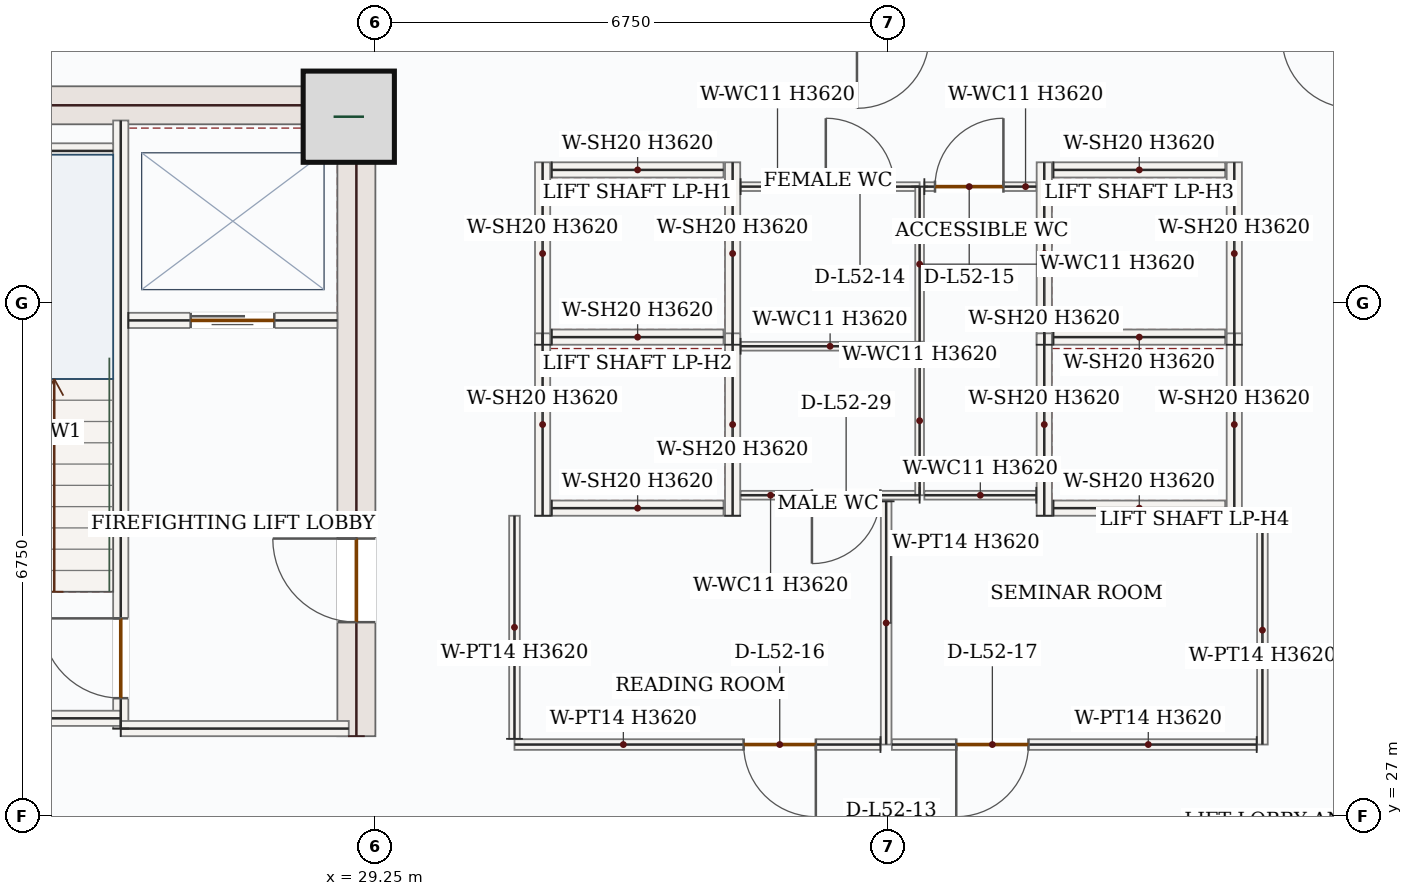
"""IFC4 building model, lengths in metres.
Left out: names, types, materials, properties, quantities, classifications, styles, units other than length and angle.
Written with IfcOpenShell. Run it as: python <this file> out.ifc"""

import sys

from ifc_helpers import new_model, si_unit, direction, frame, frame_2d, origin, origin_2d, place, context, subcontext, project, spatial, rectangle, extrude, source, transform, mapped, element, fill, save


model = new_model("IFC4")
c1 = context("Model", 3, precision=1e-05, world=origin(), true_north=direction((0.0, 1.0)))
c2 = subcontext(c1, "Body", "Model", "MODEL_VIEW")
j1 = project(units=[si_unit("LENGTHUNIT", "METRE"), si_unit("PLANEANGLEUNIT", "RADIAN")], contexts=[c1])
p1 = place(None, origin())
s1 = spatial("IfcSite", under=j1, at=p1, CompositionType="ELEMENT")
p2 = place(p1, origin())
s2 = spatial("IfcBuilding", under=s1, at=p2, CompositionType="ELEMENT")
p3 = place(p2, frame((0.0, 0.0, 221.4)))
s3 = spatial("IfcBuildingStorey", under=s2, at=p3, CompositionType="ELEMENT", Elevation=221.4)
p4 = place(p3, frame((29.0, 28.05, 0.0), z_axis=(0.0, 0.0, 1.0), x_axis=(0.0, 1.0, 0.0)))
e1 = element("IfcWall", 1, at=p4, inside=s3, PredefinedType="SHEAR", context=c2, shape_type="SweptSolid", body=[
    extrude(rectangle(XDim=8.55, YDim=0.5, at=frame_2d((4.275, 0.0))), origin(), (0.0, 0.0, 1.0), 3.62),
])
p5 = place(p4, frame((1.5, 0.0, 0.0)))
e2 = element("IfcOpeningElement", 2, at=p5, cuts=e1, PredefinedType="OPENING", context=c2, shape_type="SweptSolid", body=[
    extrude(rectangle(XDim=1.1, YDim=2.2, at=frame_2d((0.55, 1.1))), frame((0.0, 0.26, 0.0), z_axis=(0.0, -1.0, 0.0), x_axis=(1.0, 0.0, 0.0)), (0.0, 0.0, 1.0), 0.52),
])
m1 = source(origin(), c2, "Body", "SweptSolid", [
    extrude(rectangle(XDim=7.0, YDim=0.5, at=frame_2d((3.5, 0.0))), origin(), (0.0, 0.0, 1.0), 3.62),
])
p6 = place(p3, frame((21.75, 36.35, 0.0), z_axis=(0.0, 0.0, 1.0), x_axis=(1.0, 0.0, 0.0)))
e3 = element("IfcWall", 3, at=p6, inside=s3, PredefinedType="SHEAR", context=c2, shape_type="MappedRepresentation", body=[
    mapped(m1, transform((0.0, 0.0, 0.0), x_axis=(1.0, 0.0, 0.0), y_axis=(0.0, 1.0, 0.0), z_axis=(0.0, 0.0, 1.0), scale=1.0)),
])
m2 = source(origin(), c2, "Body", "SweptSolid", [
    extrude(rectangle(XDim=1.2, YDim=1.2, at=origin_2d()), origin(), (0.0, 0.0, 1.0), 3.9),
])
p7 = place(p3, frame((28.9, 36.2, 0.0), z_axis=(0.0, 0.0, 1.0), x_axis=(1.0, 0.0, 0.0)))
e4 = element("IfcColumn", 4, at=p7, inside=s3, PredefinedType="COLUMN", context=c2, shape_type="MappedRepresentation", body=[
    mapped(m2, transform((0.0, 0.0, 0.0), x_axis=(1.0, 0.0, 0.0), y_axis=(0.0, 1.0, 0.0), z_axis=(0.0, 0.0, 1.0), scale=1.0)),
])
p8 = place(p3, frame((25.9, 28.15, 0.0), z_axis=(0.0, 0.0, 1.0), x_axis=(0.0, 1.0, 0.0)))
e5 = element("IfcWall", 5, at=p8, inside=s3, PredefinedType="SOLIDWALL", context=c2, shape_type="SweptSolid", body=[
    extrude(rectangle(XDim=8.0, YDim=0.2, at=frame_2d((4.0, 0.0))), origin(), (0.0, 0.0, 1.0), 3.62),
])
p9 = place(p8, frame((0.4, 0.0, 0.0)))
e6 = element("IfcOpeningElement", 6, at=p9, cuts=e5, PredefinedType="OPENING", context=c2, shape_type="SweptSolid", body=[
    extrude(rectangle(XDim=1.05, YDim=2.15, at=frame_2d((0.525, 1.075))), frame((0.0, 0.11, 0.0), z_axis=(0.0, -1.0, 0.0), x_axis=(1.0, 0.0, 0.0)), (0.0, 0.0, 1.0), 0.22),
])
m3 = source(origin(), c2, "Body", "SweptSolid", [
    extrude(rectangle(XDim=4.25, YDim=0.2, at=frame_2d((2.125, 0.0))), origin(), (0.0, 0.0, 1.0), 3.62),
])
p10 = place(p3, frame((21.65, 28.285, 0.0), z_axis=(0.0, 0.0, 1.0), x_axis=(1.0, 0.0, 0.0)))
e7 = element("IfcWall", 7, at=p10, inside=s3, PredefinedType="SOLIDWALL", context=c2, shape_type="MappedRepresentation", body=[
    mapped(m3, transform((0.0, 0.0, 0.0), x_axis=(1.0, 0.0, 0.0), y_axis=(0.0, 1.0, 0.0), z_axis=(0.0, 0.0, 1.0), scale=1.0)),
])
m4 = source(origin(), c2, "Body", "SweptSolid", [
    extrude(rectangle(XDim=3.0, YDim=0.2, at=frame_2d((1.5, 0.0))), origin(), (0.0, 0.0, 1.0), 3.62),
])
p11 = place(p3, frame((25.9, 28.15, 0.0), z_axis=(0.0, 0.0, 1.0), x_axis=(1.0, 0.0, 0.0)))
e8 = element("IfcWall", 8, at=p11, inside=s3, PredefinedType="SOLIDWALL", context=c2, shape_type="MappedRepresentation", body=[
    mapped(m4, transform((0.0, 0.0, 0.0), x_axis=(1.0, 0.0, 0.0), y_axis=(0.0, 1.0, 0.0), z_axis=(0.0, 0.0, 1.0), scale=1.0)),
])
m5 = source(origin(), c2, "Body", "SweptSolid", [
    extrude(rectangle(XDim=3.25, YDim=0.2, at=frame_2d((1.625, 0.0))), origin(), (0.0, 0.0, 1.0), 3.62),
])
p12 = place(p3, frame((22.55, 35.75, 0.0), z_axis=(0.0, 0.0, 1.0), x_axis=(1.0, 0.0, 0.0)))
e9 = element("IfcWall", 9, at=p12, inside=s3, PredefinedType="SOLIDWALL", context=c2, shape_type="MappedRepresentation", body=[
    mapped(m5, transform((0.0, 0.0, 0.0), x_axis=(1.0, 0.0, 0.0), y_axis=(0.0, 1.0, 0.0), z_axis=(0.0, 0.0, 1.0), scale=1.0)),
])
p13 = place(p3, frame((26.0, 33.52, 0.0), z_axis=(0.0, 0.0, 1.0), x_axis=(1.0, 0.0, 0.0)))
e10 = element("IfcWall", 10, at=p13, inside=s3, PredefinedType="SOLIDWALL", context=c2, shape_type="SweptSolid", body=[
    extrude(rectangle(XDim=2.75, YDim=0.2, at=frame_2d((1.375, 0.0))), origin(), (0.0, 0.0, 1.0), 3.62),
])
p14 = place(p13, frame((0.82, 0.0, 0.0)))
e11 = element("IfcOpeningElement", 11, at=p14, cuts=e10, PredefinedType="OPENING", context=c2, shape_type="SweptSolid", body=[
    extrude(rectangle(XDim=1.1, YDim=2.15, at=frame_2d((0.55, 1.075))), frame((0.0, 0.11, 0.0), z_axis=(0.0, -1.0, 0.0), x_axis=(1.0, 0.0, 0.0)), (0.0, 0.0, 1.0), 0.22),
])
m6 = source(origin(), c2, "Body", "SweptSolid", [
    extrude(rectangle(XDim=2.4, YDim=0.2, at=frame_2d((1.2, 0.0))), origin(), (0.0, 0.0, 1.0), 3.62),
])
for number, where, z_axis, x_axis in (
    (12, (31.45, 33.2, 0.0), (0.0, 0.0, 1.0), (0.0, 1.0, 0.0)),
    (13, (33.95, 33.2, 0.0), (0.0, 0.0, 1.0), (0.0, 1.0, 0.0)),
):
    element("IfcWall", number, at=place(p3, frame(where, z_axis=z_axis, x_axis=x_axis)), inside=s3, PredefinedType="SOLIDWALL", context=c2, shape_type="MappedRepresentation", body=[
        mapped(m6, transform((0.0, 0.0, 0.0), x_axis=(1.0, 0.0, 0.0), y_axis=(0.0, 1.0, 0.0), z_axis=(0.0, 0.0, 1.0), scale=1.0)),
    ])
m7 = source(origin(), c2, "Body", "SweptSolid", [
    extrude(rectangle(XDim=2.26, YDim=0.2, at=frame_2d((1.13, 0.0))), origin(), (0.0, 0.0, 1.0), 3.62),
])
for number, where, z_axis, x_axis in (
    (14, (31.57, 33.3, 0.0), (0.0, 0.0, 1.0), (1.0, 0.0, 0.0)),
    (15, (31.57, 35.5, 0.0), (0.0, 0.0, 1.0), (1.0, 0.0, 0.0)),
):
    element("IfcWall", number, at=place(p3, frame(where, z_axis=z_axis, x_axis=x_axis)), inside=s3, PredefinedType="SOLIDWALL", context=c2, shape_type="MappedRepresentation", body=[
        mapped(m7, transform((0.0, 0.0, 0.0), x_axis=(1.0, 0.0, 0.0), y_axis=(0.0, 1.0, 0.0), z_axis=(0.0, 0.0, 1.0), scale=1.0)),
    ])
for number, where, z_axis, x_axis in (
    (16, (31.45, 30.95, 0.0), (0.0, 0.0, 1.0), (0.0, 1.0, 0.0)),
    (17, (33.95, 30.95, 0.0), (0.0, 0.0, 1.0), (0.0, 1.0, 0.0)),
):
    element("IfcWall", number, at=place(p3, frame(where, z_axis=z_axis, x_axis=x_axis)), inside=s3, PredefinedType="SOLIDWALL", context=c2, shape_type="MappedRepresentation", body=[
        mapped(m6, transform((0.0, 0.0, 0.0), x_axis=(1.0, 0.0, 0.0), y_axis=(0.0, 1.0, 0.0), z_axis=(0.0, 0.0, 1.0), scale=1.0)),
    ])
p15 = place(p3, frame((31.57, 31.05, 0.0), z_axis=(0.0, 0.0, 1.0), x_axis=(1.0, 0.0, 0.0)))
e18 = element("IfcWall", 18, at=p15, inside=s3, PredefinedType="SOLIDWALL", context=c2, shape_type="MappedRepresentation", body=[
    mapped(m7, transform((0.0, 0.0, 0.0), x_axis=(1.0, 0.0, 0.0), y_axis=(0.0, 1.0, 0.0), z_axis=(0.0, 0.0, 1.0), scale=1.0)),
])
for number, where, z_axis, x_axis in (
    (19, (38.05, 33.2, 0.0), (0.0, 0.0, 1.0), (0.0, 1.0, 0.0)),
    (20, (40.55, 33.2, 0.0), (0.0, 0.0, 1.0), (0.0, 1.0, 0.0)),
):
    element("IfcWall", number, at=place(p3, frame(where, z_axis=z_axis, x_axis=x_axis)), inside=s3, PredefinedType="SOLIDWALL", context=c2, shape_type="MappedRepresentation", body=[
        mapped(m6, transform((0.0, 0.0, 0.0), x_axis=(1.0, 0.0, 0.0), y_axis=(0.0, 1.0, 0.0), z_axis=(0.0, 0.0, 1.0), scale=1.0)),
    ])
for number, where, z_axis, x_axis in (
    (21, (38.17, 33.3, 0.0), (0.0, 0.0, 1.0), (1.0, 0.0, 0.0)),
    (22, (38.17, 35.5, 0.0), (0.0, 0.0, 1.0), (1.0, 0.0, 0.0)),
):
    element("IfcWall", number, at=place(p3, frame(where, z_axis=z_axis, x_axis=x_axis)), inside=s3, PredefinedType="SOLIDWALL", context=c2, shape_type="MappedRepresentation", body=[
        mapped(m7, transform((0.0, 0.0, 0.0), x_axis=(1.0, 0.0, 0.0), y_axis=(0.0, 1.0, 0.0), z_axis=(0.0, 0.0, 1.0), scale=1.0)),
    ])
for number, where, z_axis, x_axis in (
    (23, (38.05, 30.95, 0.0), (0.0, 0.0, 1.0), (0.0, 1.0, 0.0)),
    (24, (40.55, 30.95, 0.0), (0.0, 0.0, 1.0), (0.0, 1.0, 0.0)),
):
    element("IfcWall", number, at=place(p3, frame(where, z_axis=z_axis, x_axis=x_axis)), inside=s3, PredefinedType="SOLIDWALL", context=c2, shape_type="MappedRepresentation", body=[
        mapped(m6, transform((0.0, 0.0, 0.0), x_axis=(1.0, 0.0, 0.0), y_axis=(0.0, 1.0, 0.0), z_axis=(0.0, 0.0, 1.0), scale=1.0)),
    ])
p16 = place(p3, frame((38.17, 31.05, 0.0), z_axis=(0.0, 0.0, 1.0), x_axis=(1.0, 0.0, 0.0)))
e25 = element("IfcWall", 25, at=p16, inside=s3, PredefinedType="SOLIDWALL", context=c2, shape_type="MappedRepresentation", body=[
    mapped(m7, transform((0.0, 0.0, 0.0), x_axis=(1.0, 0.0, 0.0), y_axis=(0.0, 1.0, 0.0), z_axis=(0.0, 0.0, 1.0), scale=1.0)),
])
p17 = place(p3, frame((36.41, 31.22, 0.0), z_axis=(0.0, 0.0, 1.0), x_axis=(-1.0, 0.0, 0.0)))
e26 = element("IfcWall", 26, at=p17, inside=s3, PredefinedType="PARTITIONING", context=c2, shape_type="SweptSolid", body=[
    extrude(rectangle(XDim=2.355, YDim=0.115, at=frame_2d((1.177, 0.0))), origin(), (0.0, 0.0, 1.0), 3.62),
])
p18 = place(p17, frame((0.517, 0.0, 0.0)))
e27 = element("IfcOpeningElement", 27, at=p18, cuts=e26, PredefinedType="OPENING", context=c2, shape_type="SweptSolid", body=[
    extrude(rectangle(XDim=0.9, YDim=2.1, at=frame_2d((0.45, 1.05))), frame((0.0, 0.067, 0.0), z_axis=(0.0, -1.0, 0.0), x_axis=(1.0, 0.0, 0.0)), (0.0, 0.0, 1.0), 0.135),
])
m8 = source(origin(), c2, "Body", "SweptSolid", [
    extrude(rectangle(XDim=2.355, YDim=0.115, at=frame_2d((1.177, 0.0))), origin(), (0.0, 0.0, 1.0), 3.62),
])
p19 = place(p3, frame((34.055, 33.18, 0.0), z_axis=(0.0, 0.0, 1.0), x_axis=(1.0, 0.0, 0.0)))
e28 = element("IfcWall", 28, at=p19, inside=s3, PredefinedType="PARTITIONING", context=c2, shape_type="MappedRepresentation", body=[
    mapped(m8, transform((0.0, 0.0, 0.0), x_axis=(1.0, 0.0, 0.0), y_axis=(0.0, 1.0, 0.0), z_axis=(0.0, 0.0, 1.0), scale=1.0)),
])
m9 = source(origin(), c2, "Body", "SweptSolid", [
    extrude(rectangle(XDim=1.96, YDim=0.115, at=frame_2d((0.98, 0.0))), origin(), (0.0, 0.0, 1.0), 3.62),
])
p20 = place(p3, frame((36.41, 33.18, 0.0), z_axis=(0.0, 0.0, 1.0), x_axis=(0.0, -1.0, 0.0)))
e29 = element("IfcWall", 29, at=p20, inside=s3, PredefinedType="PARTITIONING", context=c2, shape_type="MappedRepresentation", body=[
    mapped(m9, transform((0.0, 0.0, 0.0), x_axis=(1.0, 0.0, 0.0), y_axis=(0.0, 1.0, 0.0), z_axis=(0.0, 0.0, 1.0), scale=1.0)),
])
p21 = place(p3, frame((34.055, 35.28, 0.0), z_axis=(0.0, 0.0, 1.0), x_axis=(1.0, 0.0, 0.0)))
e30 = element("IfcWall", 30, at=p21, inside=s3, PredefinedType="PARTITIONING", context=c2, shape_type="SweptSolid", body=[
    extrude(rectangle(XDim=2.355, YDim=0.115, at=frame_2d((1.177, 0.0))), origin(), (0.0, 0.0, 1.0), 3.62),
])
p22 = place(p21, frame((1.121, 0.0, 0.0)))
e31 = element("IfcOpeningElement", 31, at=p22, cuts=e30, PredefinedType="OPENING", context=c2, shape_type="SweptSolid", body=[
    extrude(rectangle(XDim=0.9, YDim=2.1, at=frame_2d((0.45, 1.05))), frame((0.0, 0.067, 0.0), z_axis=(0.0, -1.0, 0.0), x_axis=(1.0, 0.0, 0.0)), (0.0, 0.0, 1.0), 0.135),
])
m10 = source(origin(), c2, "Body", "SweptSolid", [
    extrude(rectangle(XDim=2.04, YDim=0.115, at=frame_2d((1.02, 0.0))), origin(), (0.0, 0.0, 1.0), 3.62),
])
p23 = place(p3, frame((36.41, 35.28, 0.0), z_axis=(0.0, 0.0, 1.0), x_axis=(0.0, -1.0, 0.0)))
e32 = element("IfcWall", 32, at=p23, inside=s3, PredefinedType="PARTITIONING", context=c2, shape_type="MappedRepresentation", body=[
    mapped(m10, transform((0.0, 0.0, 0.0), x_axis=(1.0, 0.0, 0.0), y_axis=(0.0, 1.0, 0.0), z_axis=(0.0, 0.0, 1.0), scale=1.0)),
])
m11 = source(origin(), c2, "Body", "SweptSolid", [
    extrude(rectangle(XDim=1.473, YDim=0.115, at=frame_2d((0.736, 0.0))), origin(), (0.0, 0.0, 1.0), 3.62),
])
p24 = place(p3, frame((37.945, 31.22, 0.0), z_axis=(0.0, 0.0, 1.0), x_axis=(-1.0, 0.0, 0.0)))
e33 = element("IfcWall", 33, at=p24, inside=s3, PredefinedType="PARTITIONING", context=c2, shape_type="MappedRepresentation", body=[
    mapped(m11, transform((0.0, 0.0, 0.0), x_axis=(1.0, 0.0, 0.0), y_axis=(0.0, 1.0, 0.0), z_axis=(0.0, 0.0, 1.0), scale=1.0)),
])
p25 = place(p3, frame((36.472, 35.28, 0.0), z_axis=(0.0, 0.0, 1.0), x_axis=(1.0, 0.0, 0.0)))
e34 = element("IfcWall", 34, at=p25, inside=s3, PredefinedType="PARTITIONING", context=c2, shape_type="SweptSolid", body=[
    extrude(rectangle(XDim=1.473, YDim=0.115, at=frame_2d((0.736, 0.0))), origin(), (0.0, 0.0, 1.0), 3.62),
])
p26 = place(p25, frame((0.14, 0.0, 0.0)))
e35 = element("IfcOpeningElement", 35, at=p26, cuts=e34, PredefinedType="OPENING", context=c2, shape_type="SweptSolid", body=[
    extrude(rectangle(XDim=0.9, YDim=2.1, at=frame_2d((0.45, 1.05))), frame((0.0, 0.067, 0.0), z_axis=(0.0, -1.0, 0.0), x_axis=(1.0, 0.0, 0.0)), (0.0, 0.0, 1.0), 0.135),
])
m12 = source(origin(), c2, "Body", "SweptSolid", [
    extrude(rectangle(XDim=3.2, YDim=0.14, at=frame_2d((1.6, 0.0))), origin(), (0.0, 0.0, 1.0), 3.62),
])
p27 = place(p3, frame((35.97, 31.14, 0.0), z_axis=(0.0, 0.0, 1.0), x_axis=(0.0, -1.0, 0.0)))
e36 = element("IfcWall", 36, at=p27, inside=s3, PredefinedType="PARTITIONING", context=c2, shape_type="MappedRepresentation", body=[
    mapped(m12, transform((0.0, 0.0, 0.0), x_axis=(1.0, 0.0, 0.0), y_axis=(0.0, 1.0, 0.0), z_axis=(0.0, 0.0, 1.0), scale=1.0)),
])
p28 = place(p3, frame((35.895, 27.94, 0.0), z_axis=(0.0, 0.0, 1.0), x_axis=(-1.0, 0.0, 0.0)))
e37 = element("IfcWall", 37, at=p28, inside=s3, PredefinedType="PARTITIONING", context=c2, shape_type="SweptSolid", body=[
    extrude(rectangle(XDim=4.815, YDim=0.14, at=frame_2d((2.407, 0.0))), origin(), (0.0, 0.0, 1.0), 3.62),
])
p29 = place(p28, frame((0.85, 0.0, 0.0)))
e38 = element("IfcOpeningElement", 38, at=p29, cuts=e37, PredefinedType="OPENING", context=c2, shape_type="SweptSolid", body=[
    extrude(rectangle(XDim=0.95, YDim=2.15, at=frame_2d((0.475, 1.075))), frame((0.0, 0.08, 0.0), z_axis=(0.0, -1.0, 0.0), x_axis=(1.0, 0.0, 0.0)), (0.0, 0.0, 1.0), 0.16),
])
m13 = source(origin(), c2, "Body", "SweptSolid", [
    extrude(rectangle(XDim=2.935, YDim=0.14, at=frame_2d((1.468, 0.0))), origin(), (0.0, 0.0, 1.0), 3.62),
])
p30 = place(p3, frame((31.08, 28.015, 0.0), z_axis=(0.0, 0.0, 1.0), x_axis=(0.0, 1.0, 0.0)))
e39 = element("IfcWall", 39, at=p30, inside=s3, PredefinedType="PARTITIONING", context=c2, shape_type="MappedRepresentation", body=[
    mapped(m13, transform((0.0, 0.0, 0.0), x_axis=(1.0, 0.0, 0.0), y_axis=(0.0, 1.0, 0.0), z_axis=(0.0, 0.0, 1.0), scale=1.0)),
])
m14 = source(origin(), c2, "Body", "SweptSolid", [
    extrude(rectangle(XDim=3.01, YDim=0.14, at=frame_2d((1.505, 0.0))), origin(), (0.0, 0.0, 1.0), 3.62),
])
p31 = place(p3, frame((40.92, 30.95, 0.0), z_axis=(0.0, 0.0, 1.0), x_axis=(0.0, -1.0, 0.0)))
e40 = element("IfcWall", 40, at=p31, inside=s3, PredefinedType="PARTITIONING", context=c2, shape_type="MappedRepresentation", body=[
    mapped(m14, transform((0.0, 0.0, 0.0), x_axis=(1.0, 0.0, 0.0), y_axis=(0.0, 1.0, 0.0), z_axis=(0.0, 0.0, 1.0), scale=1.0)),
])
p32 = place(p3, frame((40.845, 27.94, 0.0), z_axis=(0.0, 0.0, 1.0), x_axis=(-1.0, 0.0, 0.0)))
e41 = element("IfcWall", 41, at=p32, inside=s3, PredefinedType="PARTITIONING", context=c2, shape_type="SweptSolid", body=[
    extrude(rectangle(XDim=4.8, YDim=0.14, at=frame_2d((2.4, 0.0))), origin(), (0.0, 0.0, 1.0), 3.62),
])
p33 = place(p32, frame((3.003, 0.0, 0.0)))
e42 = element("IfcOpeningElement", 42, at=p33, cuts=e41, PredefinedType="OPENING", context=c2, shape_type="SweptSolid", body=[
    extrude(rectangle(XDim=0.95, YDim=2.15, at=frame_2d((0.475, 1.075))), frame((0.0, 0.08, 0.0), z_axis=(0.0, -1.0, 0.0), x_axis=(1.0, 0.0, 0.0)), (0.0, 0.0, 1.0), 0.16),
])
m15 = source(origin(), c2, "Body", "SweptSolid", [
    extrude(rectangle(XDim=1.05, YDim=2.15, at=frame_2d((0.525, 1.075))), frame((0.0, 0.025, 0.0), z_axis=(0.0, -1.0, 0.0), x_axis=(1.0, 0.0, 0.0)), (0.0, 0.0, 1.0), 0.05),
])
p34 = place(p9, origin())
e43 = element("IfcDoor", 43, at=p34, inside=s3, OperationType="SINGLE_SWING_RIGHT", PredefinedType="DOOR", context=c2, shape_type="MappedRepresentation", body=[
    mapped(m15, transform((0.0, 0.0, 0.0), x_axis=(1.0, 0.0, 0.0), y_axis=(0.0, 1.0, 0.0), z_axis=(0.0, 0.0, 1.0), scale=1.0)),
])
fill(e6, e43)
m16 = source(origin(), c2, "Body", "SweptSolid", [
    extrude(rectangle(XDim=1.1, YDim=2.15, at=frame_2d((0.55, 1.075))), frame((0.0, 0.025, 0.0), z_axis=(0.0, -1.0, 0.0), x_axis=(1.0, 0.0, 0.0)), (0.0, 0.0, 1.0), 0.05),
])
p35 = place(p14, origin())
e44 = element("IfcDoor", 44, at=p35, inside=s3, OperationType="DOUBLE_DOOR_SLIDING", PredefinedType="DOOR", context=c2, shape_type="MappedRepresentation", body=[
    mapped(m16, transform((0.0, 0.0, 0.0), x_axis=(1.0, 0.0, 0.0), y_axis=(0.0, 1.0, 0.0), z_axis=(0.0, 0.0, 1.0), scale=1.0)),
])
fill(e11, e44)
m17 = source(origin(), c2, "Body", "SweptSolid", [
    extrude(rectangle(XDim=1.1, YDim=2.2, at=frame_2d((0.55, 1.1))), frame((0.0, 0.025, 0.0), z_axis=(0.0, -1.0, 0.0), x_axis=(1.0, 0.0, 0.0)), (0.0, 0.0, 1.0), 0.05),
])
p36 = place(p5, origin())
e45 = element("IfcDoor", 45, at=p36, inside=s3, OperationType="SINGLE_SWING_RIGHT", PredefinedType="DOOR", context=c2, shape_type="MappedRepresentation", body=[
    mapped(m17, transform((0.0, 0.0, 0.0), x_axis=(1.0, 0.0, 0.0), y_axis=(0.0, 1.0, 0.0), z_axis=(0.0, 0.0, 1.0), scale=1.0)),
])
fill(e2, e45)
m18 = source(origin(), c2, "Body", "SweptSolid", [
    extrude(rectangle(XDim=0.9, YDim=2.1, at=frame_2d((0.45, 1.05))), frame((0.0, 0.025, 0.0), z_axis=(0.0, -1.0, 0.0), x_axis=(1.0, 0.0, 0.0)), (0.0, 0.0, 1.0), 0.05),
])
p37 = place(p22, origin())
e46 = element("IfcDoor", 46, at=p37, inside=s3, OperationType="SINGLE_SWING_LEFT", PredefinedType="DOOR", context=c2, shape_type="MappedRepresentation", body=[
    mapped(m18, transform((0.0, 0.0, 0.0), x_axis=(1.0, 0.0, 0.0), y_axis=(0.0, 1.0, 0.0), z_axis=(0.0, 0.0, 1.0), scale=1.0)),
])
fill(e31, e46)
p38 = place(p26, origin())
e47 = element("IfcDoor", 47, at=p38, inside=s3, OperationType="SINGLE_SWING_RIGHT", PredefinedType="DOOR", context=c2, shape_type="MappedRepresentation", body=[
    mapped(m18, transform((0.0, 0.0, 0.0), x_axis=(1.0, 0.0, 0.0), y_axis=(0.0, 1.0, 0.0), z_axis=(0.0, 0.0, 1.0), scale=1.0)),
])
fill(e35, e47)
m19 = source(origin(), c2, "Body", "SweptSolid", [
    extrude(rectangle(XDim=0.95, YDim=2.15, at=frame_2d((0.475, 1.075))), frame((0.0, 0.025, 0.0), z_axis=(0.0, -1.0, 0.0), x_axis=(1.0, 0.0, 0.0)), (0.0, 0.0, 1.0), 0.05),
])
p39 = place(p29, origin())
e48 = element("IfcDoor", 48, at=p39, inside=s3, OperationType="SINGLE_SWING_LEFT", PredefinedType="DOOR", context=c2, shape_type="MappedRepresentation", body=[
    mapped(m19, transform((0.0, 0.0, 0.0), x_axis=(1.0, 0.0, 0.0), y_axis=(0.0, 1.0, 0.0), z_axis=(0.0, 0.0, 1.0), scale=1.0)),
])
fill(e38, e48)
p40 = place(p33, origin())
e49 = element("IfcDoor", 49, at=p40, inside=s3, OperationType="SINGLE_SWING_RIGHT", PredefinedType="DOOR", context=c2, shape_type="MappedRepresentation", body=[
    mapped(m19, transform((0.0, 0.0, 0.0), x_axis=(1.0, 0.0, 0.0), y_axis=(0.0, 1.0, 0.0), z_axis=(0.0, 0.0, 1.0), scale=1.0)),
])
fill(e42, e49)
p41 = place(p18, origin())
e50 = element("IfcDoor", 50, at=p41, inside=s3, OperationType="SINGLE_SWING_RIGHT", PredefinedType="DOOR", context=c2, shape_type="MappedRepresentation", body=[
    mapped(m18, transform((0.0, 0.0, 0.0), x_axis=(1.0, 0.0, 0.0), y_axis=(0.0, 1.0, 0.0), z_axis=(0.0, 0.0, 1.0), scale=1.0)),
])
fill(e27, e50)
save(model, sys.argv[1])
